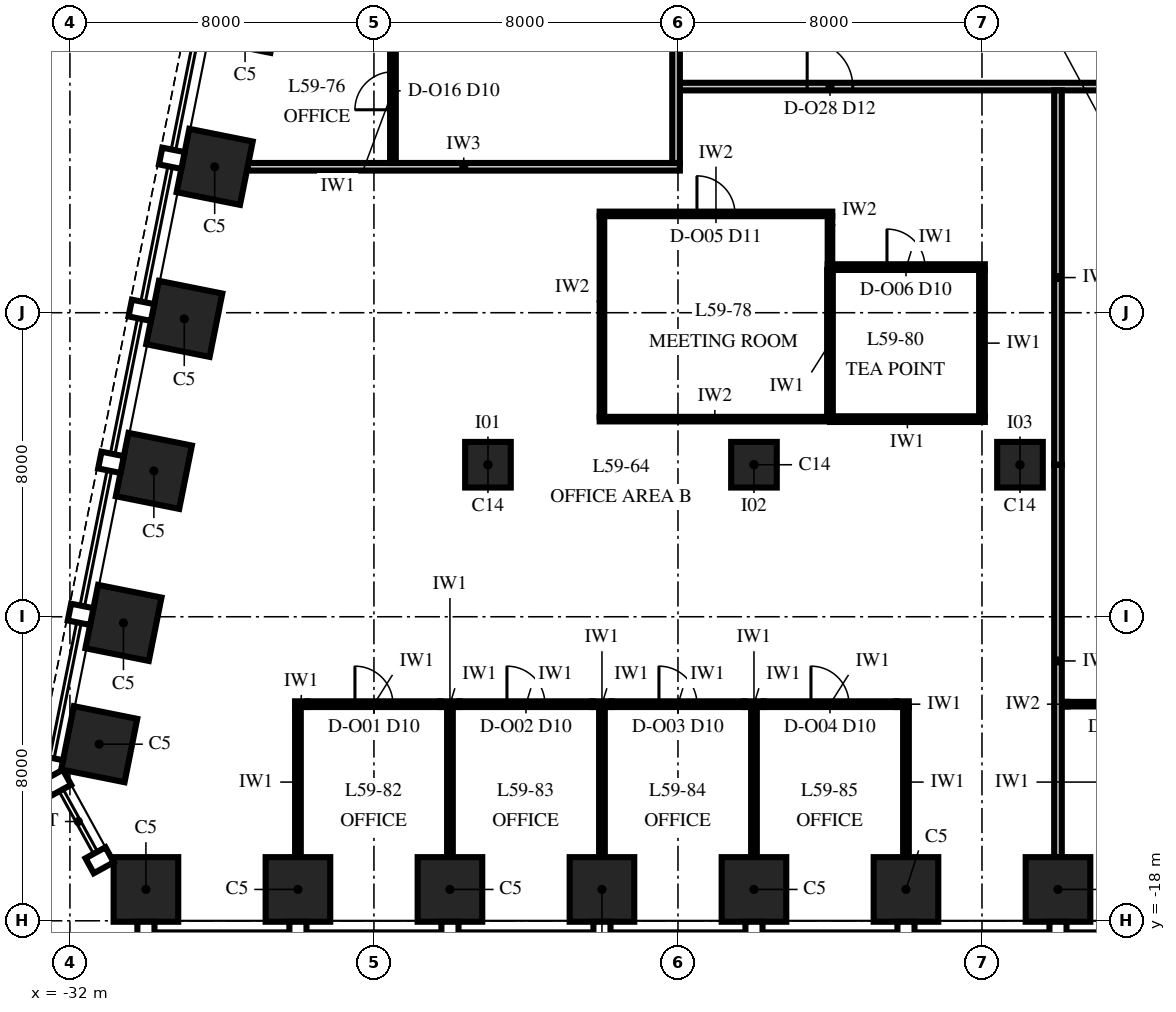
"""IFC4 building model, lengths in metres.
Left out: names, types, materials, properties, quantities, classifications, styles, units other than length and angle.
Written with IfcOpenShell. Run it as: python <this file> out.ifc"""

import sys

from ifc_helpers import new_model, si_unit, direction, frame, frame_2d, origin, origin_2d, place, context, subcontext, project, spatial, rectangle, extrude, element, fill, save


model = new_model("IFC4")
c1 = context("Model", 3, precision=1e-05, world=origin(), true_north=direction((0.0, 1.0)))
c2 = subcontext(c1, "Body", "Model", "MODEL_VIEW")
j1 = project(units=[si_unit("LENGTHUNIT", "METRE"), si_unit("PLANEANGLEUNIT", "RADIAN")], contexts=[c1])
p1 = place(None, origin())
s1 = spatial("IfcSite", under=j1, at=p1, CompositionType="ELEMENT")
p2 = place(p1, origin())
s2 = spatial("IfcBuilding", under=s1, at=p2, CompositionType="ELEMENT")
p3 = place(p2, frame((0.0, 0.0, 256.0)))
s3 = spatial("IfcBuildingStorey", under=s2, at=p3, CompositionType="ELEMENT", Elevation=256.0)
p4 = place(p3, frame((-30.0, -17.175, 0.0), z_axis=(0.0, 0.0, 1.0), x_axis=(1.0, 0.0, 0.0)))
e1 = element("IfcColumn", 1, at=p4, inside=s3, PredefinedType="COLUMN", context=c2, shape_type="SweptSolid", body=[
    extrude(rectangle(XDim=1.7, YDim=1.7, at=origin_2d()), origin(), (0.0, 0.0, 1.0), 4.0),
])
for number, where, z_axis, x_axis in (
    (2, (-26.0, -17.175, 0.0), (0.0, 0.0, 1.0), (1.0, 0.0, 0.0)),
    (3, (-22.0, -17.175, 0.0), (0.0, 0.0, 1.0), (1.0, 0.0, 0.0)),
    (4, (-18.0, -17.175, 0.0), (0.0, 0.0, 1.0), (1.0, 0.0, 0.0)),
    (5, (-14.0, -17.175, 0.0), (0.0, 0.0, 1.0), (1.0, 0.0, 0.0)),
    (6, (-10.0, -17.175, 0.0), (0.0, 0.0, 1.0), (1.0, 0.0, 0.0)),
    (7, (-6.0, -17.175, 0.0), (0.0, 0.0, 1.0), (1.0, 0.0, 0.0)),
):
    element("IfcColumn", number, at=place(p3, frame(where, z_axis=z_axis, x_axis=x_axis)), inside=s3, PredefinedType="COLUMN", context=c2, shape_type="SweptSolid", body=[
        extrude(rectangle(XDim=1.7, YDim=1.7, at=origin_2d()), origin(), (0.0, 0.0, 1.0), 3.75),
    ])
for number, where, z_axis, x_axis in (
    (8, (-27.391, 5.838, 0.0), (0.0, 0.0, 1.0), (-0.196, -0.981, 0.0)),
    (9, (-28.191, 1.838, 0.0), (0.0, 0.0, 1.0), (-0.196, -0.981, 0.0)),
    (10, (-28.991, -2.162, 0.0), (0.0, 0.0, 1.0), (-0.196, -0.981, 0.0)),
    (11, (-29.791, -6.162, 0.0), (0.0, 0.0, 1.0), (-0.196, -0.981, 0.0)),
    (12, (-30.591, -10.162, 0.0), (0.0, 0.0, 1.0), (-0.196, -0.981, 0.0)),
):
    element("IfcColumn", number, at=place(p3, frame(where, z_axis=z_axis, x_axis=x_axis)), inside=s3, PredefinedType="COLUMN", context=c2, shape_type="SweptSolid", body=[
        extrude(rectangle(XDim=1.7, YDim=1.7, at=origin_2d()), origin(), (0.0, 0.0, 1.0), 4.0),
    ])
p5 = place(p3, frame((-31.229, -13.353, 0.0), z_axis=(0.0, 0.0, 1.0), x_axis=(-0.196116135138, -0.980580675691, 0.0)))
e13 = element("IfcColumn", 13, at=p5, inside=s3, PredefinedType="COLUMN", context=c2, shape_type="SweptSolid", body=[
    extrude(rectangle(XDim=1.7, YDim=1.7, at=origin_2d()), origin(), (0.0, 0.0, 1.0), 3.75),
])
for number, where, z_axis, x_axis in (
    (14, (-21.0, -6.0, 0.0), (0.0, 0.0, 1.0), (1.0, 0.0, 0.0)),
    (15, (-14.0, -6.0, 0.0), (0.0, 0.0, 1.0), (1.0, 0.0, 0.0)),
    (16, (-7.0, -6.0, 0.0), (0.0, 0.0, 1.0), (1.0, 0.0, 0.0)),
):
    element("IfcColumn", number, at=place(p3, frame(where, z_axis=z_axis, x_axis=x_axis)), inside=s3, PredefinedType="COLUMN", context=c2, shape_type="SweptSolid", body=[
        extrude(rectangle(XDim=1.2, YDim=1.2, at=origin_2d()), origin(), (0.0, 0.0, 1.0), 4.0),
    ])
p6 = place(p3, frame((-26.075, -12.3, 0.0), z_axis=(0.0, 0.0, 1.0), x_axis=(1.0, 0.0, 0.0)))
e17 = element("IfcWall", 17, at=p6, inside=s3, PredefinedType="PARTITIONING", context=c2, shape_type="SweptSolid", body=[
    extrude(rectangle(XDim=0.325, YDim=0.15, at=frame_2d((0.163, 0.0))), origin(), (0.0, 0.0, 1.0), 2.15),
])
p7 = place(p3, frame((-25.75, -12.3, 0.0), z_axis=(0.0, 0.0, 1.0), x_axis=(1.0, 0.0, 0.0)))
e18 = element("IfcWall", 18, at=p7, inside=s3, PredefinedType="PARTITIONING", context=c2, shape_type="SweptSolid", body=[
    extrude(rectangle(XDim=3.5, YDim=0.15, at=frame_2d((1.75, 0.0))), origin(), (0.0, 0.0, 1.0), 3.85),
])
p8 = place(p7, frame((1.25, 0.0, 0.0)))
e19 = element("IfcOpeningElement", 19, at=p8, cuts=e18, PredefinedType="OPENING", context=c2, shape_type="SweptSolid", body=[
    extrude(rectangle(XDim=1.0, YDim=2.3, at=frame_2d((0.5, 1.15))), frame((0.0, 0.09, 0.0), z_axis=(0.0, -1.0, 0.0), x_axis=(1.0, 0.0, 0.0)), (0.0, 0.0, 1.0), 0.18),
])
p9 = place(p3, frame((-22.25, -12.3, 0.0), z_axis=(0.0, 0.0, 1.0), x_axis=(1.0, 0.0, 0.0)))
e20 = element("IfcWall", 20, at=p9, inside=s3, PredefinedType="PARTITIONING", context=c2, shape_type="SweptSolid", body=[
    extrude(rectangle(XDim=0.5, YDim=0.15, at=frame_2d((0.25, 0.0))), origin(), (0.0, 0.0, 1.0), 2.15),
])
p10 = place(p3, frame((-21.75, -12.3, 0.0), z_axis=(0.0, 0.0, 1.0), x_axis=(1.0, 0.0, 0.0)))
e21 = element("IfcWall", 21, at=p10, inside=s3, PredefinedType="PARTITIONING", context=c2, shape_type="SweptSolid", body=[
    extrude(rectangle(XDim=3.5, YDim=0.15, at=frame_2d((1.75, 0.0))), origin(), (0.0, 0.0, 1.0), 3.85),
])
p11 = place(p10, frame((1.25, 0.0, 0.0)))
e22 = element("IfcOpeningElement", 22, at=p11, cuts=e21, PredefinedType="OPENING", context=c2, shape_type="SweptSolid", body=[
    extrude(rectangle(XDim=1.0, YDim=2.3, at=frame_2d((0.5, 1.15))), frame((0.0, 0.09, 0.0), z_axis=(0.0, -1.0, 0.0), x_axis=(1.0, 0.0, 0.0)), (0.0, 0.0, 1.0), 0.18),
])
p12 = place(p3, frame((-18.25, -12.3, 0.0), z_axis=(0.0, 0.0, 1.0), x_axis=(1.0, 0.0, 0.0)))
e23 = element("IfcWall", 23, at=p12, inside=s3, PredefinedType="PARTITIONING", context=c2, shape_type="SweptSolid", body=[
    extrude(rectangle(XDim=0.5, YDim=0.15, at=frame_2d((0.25, 0.0))), origin(), (0.0, 0.0, 1.0), 2.15),
])
p13 = place(p3, frame((-17.75, -12.3, 0.0), z_axis=(0.0, 0.0, 1.0), x_axis=(1.0, 0.0, 0.0)))
e24 = element("IfcWall", 24, at=p13, inside=s3, PredefinedType="PARTITIONING", context=c2, shape_type="SweptSolid", body=[
    extrude(rectangle(XDim=3.5, YDim=0.15, at=frame_2d((1.75, 0.0))), origin(), (0.0, 0.0, 1.0), 3.85),
])
p14 = place(p13, frame((1.25, 0.0, 0.0)))
e25 = element("IfcOpeningElement", 25, at=p14, cuts=e24, PredefinedType="OPENING", context=c2, shape_type="SweptSolid", body=[
    extrude(rectangle(XDim=1.0, YDim=2.3, at=frame_2d((0.5, 1.15))), frame((0.0, 0.09, 0.0), z_axis=(0.0, -1.0, 0.0), x_axis=(1.0, 0.0, 0.0)), (0.0, 0.0, 1.0), 0.18),
])
p15 = place(p3, frame((-14.25, -12.3, 0.0), z_axis=(0.0, 0.0, 1.0), x_axis=(1.0, 0.0, 0.0)))
e26 = element("IfcWall", 26, at=p15, inside=s3, PredefinedType="PARTITIONING", context=c2, shape_type="SweptSolid", body=[
    extrude(rectangle(XDim=0.5, YDim=0.15, at=frame_2d((0.25, 0.0))), origin(), (0.0, 0.0, 1.0), 2.15),
])
p16 = place(p3, frame((-13.75, -12.3, 0.0), z_axis=(0.0, 0.0, 1.0), x_axis=(1.0, 0.0, 0.0)))
e27 = element("IfcWall", 27, at=p16, inside=s3, PredefinedType="PARTITIONING", context=c2, shape_type="SweptSolid", body=[
    extrude(rectangle(XDim=3.5, YDim=0.15, at=frame_2d((1.75, 0.0))), origin(), (0.0, 0.0, 1.0), 3.85),
])
p17 = place(p16, frame((1.25, 0.0, 0.0)))
e28 = element("IfcOpeningElement", 28, at=p17, cuts=e27, PredefinedType="OPENING", context=c2, shape_type="SweptSolid", body=[
    extrude(rectangle(XDim=1.0, YDim=2.3, at=frame_2d((0.5, 1.15))), frame((0.0, 0.09, 0.0), z_axis=(0.0, -1.0, 0.0), x_axis=(1.0, 0.0, 0.0)), (0.0, 0.0, 1.0), 0.18),
])
p18 = place(p3, frame((-10.25, -12.3, 0.0), z_axis=(0.0, 0.0, 1.0), x_axis=(1.0, 0.0, 0.0)))
e29 = element("IfcWall", 29, at=p18, inside=s3, PredefinedType="PARTITIONING", context=c2, shape_type="SweptSolid", body=[
    extrude(rectangle(XDim=0.325, YDim=0.15, at=frame_2d((0.163, 0.0))), origin(), (0.0, 0.0, 1.0), 2.15),
])
p19 = place(p3, frame((-5.9, -12.3, 0.0), z_axis=(0.0, 0.0, 1.0), x_axis=(1.0, 0.0, 0.0)))
e30 = element("IfcWall", 30, at=p19, inside=s3, PredefinedType="PARTITIONING", context=c2, shape_type="SweptSolid", body=[
    extrude(rectangle(XDim=0.15, YDim=0.12, at=frame_2d((0.075, 0.0))), origin(), (0.0, 0.0, 1.0), 2.15),
])
p20 = place(p3, frame((-5.75, -12.3, 0.0), z_axis=(0.0, 0.0, 1.0), x_axis=(1.0, 0.0, 0.0)))
e31 = element("IfcWall", 31, at=p20, inside=s3, PredefinedType="PARTITIONING", context=c2, shape_type="SweptSolid", body=[
    extrude(rectangle(XDim=3.5, YDim=0.12, at=frame_2d((1.75, 0.0))), origin(), (0.0, 0.0, 1.0), 3.85),
])
p21 = place(p20, frame((1.25, 0.0, 0.0)))
e32 = element("IfcOpeningElement", 32, at=p21, cuts=e31, PredefinedType="OPENING", context=c2, shape_type="SweptSolid", body=[
    extrude(rectangle(XDim=1.0, YDim=2.4, at=frame_2d((0.5, 1.2))), frame((0.0, 0.075, 0.0), z_axis=(0.0, -1.0, 0.0), x_axis=(1.0, 0.0, 0.0)), (0.0, 0.0, 1.0), 0.15),
])
p22 = place(p3, frame((-18.06, -4.8, 0.0), z_axis=(0.0, 0.0, 1.0), x_axis=(1.0, 0.0, 0.0)))
e33 = element("IfcWall", 33, at=p22, inside=s3, PredefinedType="PARTITIONING", context=c2, shape_type="SweptSolid", body=[
    extrude(rectangle(XDim=6.06, YDim=0.12, at=frame_2d((3.03, 0.0))), origin(), (0.0, 0.0, 1.0), 3.23),
])
p23 = place(p3, frame((-12.0, -4.8, 0.0), z_axis=(0.0, 0.0, 1.0), x_axis=(1.0, 0.0, 0.0)))
e34 = element("IfcWall", 34, at=p23, inside=s3, PredefinedType="PARTITIONING", context=c2, shape_type="SweptSolid", body=[
    extrude(rectangle(XDim=4.075, YDim=0.15, at=frame_2d((2.038, 0.0))), origin(), (0.0, 0.0, 1.0), 3.23),
])
p24 = place(p3, frame((-12.06, -0.8, 0.0), z_axis=(0.0, 0.0, 1.0), x_axis=(1.0, 0.0, 0.0)))
e35 = element("IfcWall", 35, at=p24, inside=s3, PredefinedType="PARTITIONING", context=c2, shape_type="SweptSolid", body=[
    extrude(rectangle(XDim=4.135, YDim=0.15, at=frame_2d((2.067, 0.0))), origin(), (0.0, 0.0, 1.0), 3.23),
])
p25 = place(p24, frame((1.56, 0.0, 0.0)))
e36 = element("IfcOpeningElement", 36, at=p25, cuts=e35, PredefinedType="OPENING", context=c2, shape_type="SweptSolid", body=[
    extrude(rectangle(XDim=1.0, YDim=2.3, at=frame_2d((0.5, 1.15))), frame((0.0, 0.09, 0.0), z_axis=(0.0, -1.0, 0.0), x_axis=(1.0, 0.0, 0.0)), (0.0, 0.0, 1.0), 0.18),
])
p26 = place(p3, frame((-18.06, 0.6, 0.0), z_axis=(0.0, 0.0, 1.0), x_axis=(1.0, 0.0, 0.0)))
e37 = element("IfcWall", 37, at=p26, inside=s3, PredefinedType="PARTITIONING", context=c2, shape_type="SweptSolid", body=[
    extrude(rectangle(XDim=6.12, YDim=0.12, at=frame_2d((3.06, 0.0))), origin(), (0.0, 0.0, 1.0), 3.23),
])
p27 = place(p26, frame((2.56, 0.0, 0.0)))
e38 = element("IfcOpeningElement", 38, at=p27, cuts=e37, PredefinedType="OPENING", context=c2, shape_type="SweptSolid", body=[
    extrude(rectangle(XDim=1.0, YDim=2.4, at=frame_2d((0.5, 1.2))), frame((0.0, 0.075, 0.0), z_axis=(0.0, -1.0, 0.0), x_axis=(1.0, 0.0, 0.0)), (0.0, 0.0, 1.0), 0.15),
])
p28 = place(p3, frame((-27.324, 1.84, 0.0), z_axis=(0.0, 0.0, 1.0), x_axis=(1.0, 0.0, 0.0)))
e39 = element("IfcWall", 39, at=p28, inside=s3, PredefinedType="PARTITIONING", context=c2, shape_type="SweptSolid", body=[
    extrude(rectangle(XDim=11.374, YDim=0.2, at=frame_2d((5.687, 0.0))), origin(), (0.0, 0.0, 1.0), 3.23),
])
p29 = place(p3, frame((-15.95, 3.95, 0.0), z_axis=(0.0, 0.0, 1.0), x_axis=(1.0, 0.0, 0.0)))
e40 = element("IfcWall", 40, at=p29, inside=s3, PredefinedType="PARTITIONING", context=c2, shape_type="SweptSolid", body=[
    extrude(rectangle(XDim=31.9, YDim=0.2, at=frame_2d((15.95, 0.0))), origin(), (0.0, 0.0, 1.0), 3.23),
])
p30 = place(p29, frame((3.35, 0.0, 0.0)))
e41 = element("IfcOpeningElement", 41, at=p30, cuts=e40, PredefinedType="OPENING", context=c2, shape_type="SweptSolid", body=[
    extrude(rectangle(XDim=1.2, YDim=2.4, at=frame_2d((0.6, 1.2))), frame((0.0, 0.115, 0.0), z_axis=(0.0, -1.0, 0.0), x_axis=(1.0, 0.0, 0.0)), (0.0, 0.0, 1.0), 0.23),
])
p31 = place(p29, frame((27.35, 0.0, 0.0)))
e42 = element("IfcOpeningElement", 42, at=p31, cuts=e40, PredefinedType="OPENING", context=c2, shape_type="SweptSolid", body=[
    extrude(rectangle(XDim=1.2, YDim=2.4, at=frame_2d((0.6, 1.2))), frame((0.0, 0.115, 0.0), z_axis=(0.0, -1.0, 0.0), x_axis=(1.0, 0.0, 0.0)), (0.0, 0.0, 1.0), 0.23),
])
p32 = place(p29, frame((15.35, 0.0, 0.0)))
e43 = element("IfcOpeningElement", 43, at=p32, cuts=e40, PredefinedType="OPENING", context=c2, shape_type="SweptSolid", body=[
    extrude(rectangle(XDim=1.2, YDim=2.4, at=frame_2d((0.6, 1.2))), frame((0.0, 0.115, 0.0), z_axis=(0.0, -1.0, 0.0), x_axis=(1.0, 0.0, 0.0)), (0.0, 0.0, 1.0), 0.23),
])
p33 = place(p3, frame((-26.0, -16.325, 0.0), z_axis=(0.0, 0.0, 1.0), x_axis=(0.0, 1.0, 0.0)))
e44 = element("IfcWall", 44, at=p33, inside=s3, PredefinedType="PARTITIONING", context=c2, shape_type="SweptSolid", body=[
    extrude(rectangle(XDim=3.95, YDim=0.15, at=frame_2d((1.975, 0.0))), origin(), (0.0, 0.0, 1.0), 2.15),
])
p34 = place(p3, frame((-23.5, 1.94, 0.0), z_axis=(0.0, 0.0, 1.0), x_axis=(0.0, 1.0, 0.0)))
e45 = element("IfcWall", 45, at=p34, inside=s3, PredefinedType="PARTITIONING", context=c2, shape_type="SweptSolid", body=[
    extrude(rectangle(XDim=3.825, YDim=0.15, at=frame_2d((1.913, 0.0))), origin(), (0.0, 0.0, 1.0), 3.85),
])
p35 = place(p34, frame((1.4, 0.0, 0.0)))
e46 = element("IfcOpeningElement", 46, at=p35, cuts=e45, PredefinedType="OPENING", context=c2, shape_type="SweptSolid", body=[
    extrude(rectangle(XDim=1.0, YDim=2.3, at=frame_2d((0.5, 1.15))), frame((0.0, 0.09, 0.0), z_axis=(0.0, -1.0, 0.0), x_axis=(1.0, 0.0, 0.0)), (0.0, 0.0, 1.0), 0.18),
])
for number, where, z_axis, x_axis in (
    (47, (-22.0, -16.325, 0.0), (0.0, 0.0, 1.0), (0.0, 1.0, 0.0)),
    (48, (-18.0, -16.325, 0.0), (0.0, 0.0, 1.0), (0.0, 1.0, 0.0)),
):
    element("IfcWall", number, at=place(p3, frame(where, z_axis=z_axis, x_axis=x_axis)), inside=s3, PredefinedType="PARTITIONING", context=c2, shape_type="SweptSolid", body=[
        extrude(rectangle(XDim=3.95, YDim=0.15, at=frame_2d((1.975, 0.0))), origin(), (0.0, 0.0, 1.0), 2.15),
    ])
p36 = place(p3, frame((-18.0, -4.74, 0.0), z_axis=(0.0, 0.0, 1.0), x_axis=(0.0, 1.0, 0.0)))
e49 = element("IfcWall", 49, at=p36, inside=s3, PredefinedType="PARTITIONING", context=c2, shape_type="SweptSolid", body=[
    extrude(rectangle(XDim=5.28, YDim=0.12, at=frame_2d((2.64, 0.0))), origin(), (0.0, 0.0, 1.0), 3.23),
])
p37 = place(p3, frame((-16.05, 1.94, 0.0), z_axis=(0.0, 0.0, 1.0), x_axis=(0.0, 1.0, 0.0)))
e50 = element("IfcWall", 50, at=p37, inside=s3, PredefinedType="PARTITIONING", context=c2, shape_type="SweptSolid", body=[
    extrude(rectangle(XDim=24.01, YDim=0.2, at=frame_2d((12.005, 0.0))), origin(), (0.0, 0.0, 1.0), 2.842),
])
p38 = place(p37, frame((8.46, 0.0, 0.0)))
e51 = element("IfcOpeningElement", 51, at=p38, cuts=e50, PredefinedType="OPENING", context=c2, shape_type="SweptSolid", body=[
    extrude(rectangle(XDim=1.2, YDim=2.4, at=frame_2d((0.6, 1.2))), frame((0.0, 0.115, 0.0), z_axis=(0.0, -1.0, 0.0), x_axis=(1.0, 0.0, 0.0)), (0.0, 0.0, 1.0), 0.23),
])
p39 = place(p3, frame((-14.0, -16.325, 0.0), z_axis=(0.0, 0.0, 1.0), x_axis=(0.0, 1.0, 0.0)))
e52 = element("IfcWall", 52, at=p39, inside=s3, PredefinedType="PARTITIONING", context=c2, shape_type="SweptSolid", body=[
    extrude(rectangle(XDim=3.95, YDim=0.15, at=frame_2d((1.975, 0.0))), origin(), (0.0, 0.0, 1.0), 2.15),
])
p40 = place(p3, frame((-12.0, -4.725, 0.0), z_axis=(0.0, 0.0, 1.0), x_axis=(0.0, 1.0, 0.0)))
e53 = element("IfcWall", 53, at=p40, inside=s3, PredefinedType="PARTITIONING", context=c2, shape_type="SweptSolid", body=[
    extrude(rectangle(XDim=3.85, YDim=0.15, at=frame_2d((1.925, 0.0))), origin(), (0.0, 0.0, 1.0), 3.85),
])
p41 = place(p3, frame((-12.0, -0.725, 0.0), z_axis=(0.0, 0.0, 1.0), x_axis=(0.0, 1.0, 0.0)))
e54 = element("IfcWall", 54, at=p41, inside=s3, PredefinedType="PARTITIONING", context=c2, shape_type="SweptSolid", body=[
    extrude(rectangle(XDim=1.265, YDim=0.12, at=frame_2d((0.633, 0.0))), origin(), (0.0, 0.0, 1.0), 3.85),
])
p42 = place(p3, frame((-10.0, -16.325, 0.0), z_axis=(0.0, 0.0, 1.0), x_axis=(0.0, 1.0, 0.0)))
e55 = element("IfcWall", 55, at=p42, inside=s3, PredefinedType="PARTITIONING", context=c2, shape_type="SweptSolid", body=[
    extrude(rectangle(XDim=3.95, YDim=0.15, at=frame_2d((1.975, 0.0))), origin(), (0.0, 0.0, 1.0), 2.15),
])
p43 = place(p3, frame((-8.0, -4.725, 0.0), z_axis=(0.0, 0.0, 1.0), x_axis=(0.0, 1.0, 0.0)))
e56 = element("IfcWall", 56, at=p43, inside=s3, PredefinedType="PARTITIONING", context=c2, shape_type="SweptSolid", body=[
    extrude(rectangle(XDim=3.85, YDim=0.15, at=frame_2d((1.925, 0.0))), origin(), (0.0, 0.0, 1.0), 3.85),
])
p44 = place(p3, frame((-6.0, -16.325, 0.0), z_axis=(0.0, 0.0, 1.0), x_axis=(0.0, 1.0, 0.0)))
e57 = element("IfcWall", 57, at=p44, inside=s3, PredefinedType="PARTITIONING", context=c2, shape_type="SweptSolid", body=[
    extrude(rectangle(XDim=10.325, YDim=0.2, at=frame_2d((5.163, 0.0))), origin(), (0.0, 0.0, 1.0), 2.15),
])
p45 = place(p3, frame((-6.0, -6.0, 0.0), z_axis=(0.0, 0.0, 1.0), x_axis=(0.0, 1.0, 0.0)))
e58 = element("IfcWall", 58, at=p45, inside=s3, PredefinedType="PARTITIONING", context=c2, shape_type="SweptSolid", body=[
    extrude(rectangle(XDim=9.85, YDim=0.2, at=frame_2d((4.925, 0.0))), origin(), (0.0, 0.0, 1.0), 2.85),
])
p46 = place(p8, origin())
e59 = element("IfcDoor", 59, at=p46, inside=s3, OperationType="SINGLE_SWING_LEFT", PredefinedType="DOOR", context=c2, shape_type="SweptSolid", body=[
    extrude(rectangle(XDim=1.0, YDim=2.3, at=frame_2d((0.5, 1.15))), frame((0.0, 0.075, 0.0), z_axis=(0.0, -1.0, 0.0), x_axis=(1.0, 0.0, 0.0)), (0.0, 0.0, 1.0), 0.149),
])
fill(e19, e59)
p47 = place(p11, origin())
e60 = element("IfcDoor", 60, at=p47, inside=s3, OperationType="SINGLE_SWING_LEFT", PredefinedType="DOOR", context=c2, shape_type="SweptSolid", body=[
    extrude(rectangle(XDim=1.0, YDim=2.3, at=frame_2d((0.5, 1.15))), frame((0.0, 0.075, 0.0), z_axis=(0.0, -1.0, 0.0), x_axis=(1.0, 0.0, 0.0)), (0.0, 0.0, 1.0), 0.149),
])
fill(e22, e60)
p48 = place(p14, origin())
e61 = element("IfcDoor", 61, at=p48, inside=s3, OperationType="SINGLE_SWING_LEFT", PredefinedType="DOOR", context=c2, shape_type="SweptSolid", body=[
    extrude(rectangle(XDim=1.0, YDim=2.3, at=frame_2d((0.5, 1.15))), frame((0.0, 0.075, 0.0), z_axis=(0.0, -1.0, 0.0), x_axis=(1.0, 0.0, 0.0)), (0.0, 0.0, 1.0), 0.149),
])
fill(e25, e61)
p49 = place(p17, origin())
e62 = element("IfcDoor", 62, at=p49, inside=s3, OperationType="SINGLE_SWING_LEFT", PredefinedType="DOOR", context=c2, shape_type="SweptSolid", body=[
    extrude(rectangle(XDim=1.0, YDim=2.3, at=frame_2d((0.5, 1.15))), frame((0.0, 0.075, 0.0), z_axis=(0.0, -1.0, 0.0), x_axis=(1.0, 0.0, 0.0)), (0.0, 0.0, 1.0), 0.149),
])
fill(e28, e62)
p50 = place(p27, origin())
e63 = element("IfcDoor", 63, at=p50, inside=s3, OperationType="SINGLE_SWING_RIGHT", PredefinedType="DOOR", context=c2, shape_type="SweptSolid", body=[
    extrude(rectangle(XDim=1.0, YDim=2.4, at=frame_2d((0.5, 1.2))), frame((0.0, 0.06, 0.0), z_axis=(0.0, -1.0, 0.0), x_axis=(1.0, 0.0, 0.0)), (0.0, 0.0, 1.0), 0.12),
])
fill(e38, e63)
p51 = place(p25, origin())
e64 = element("IfcDoor", 64, at=p51, inside=s3, OperationType="SINGLE_SWING_LEFT", PredefinedType="DOOR", context=c2, shape_type="SweptSolid", body=[
    extrude(rectangle(XDim=1.0, YDim=2.3, at=frame_2d((0.5, 1.15))), frame((0.0, 0.075, 0.0), z_axis=(0.0, -1.0, 0.0), x_axis=(1.0, 0.0, 0.0)), (0.0, 0.0, 1.0), 0.149),
])
fill(e36, e64)
p52 = place(p35, origin())
e65 = element("IfcDoor", 65, at=p52, inside=s3, OperationType="SINGLE_SWING_LEFT", PredefinedType="DOOR", context=c2, shape_type="SweptSolid", body=[
    extrude(rectangle(XDim=1.0, YDim=2.3, at=frame_2d((0.5, 1.15))), frame((0.0, 0.075, 0.0), z_axis=(0.0, -1.0, 0.0), x_axis=(1.0, 0.0, 0.0)), (0.0, 0.0, 1.0), 0.149),
])
fill(e46, e65)
p53 = place(p30, origin())
e66 = element("IfcDoor", 66, at=p53, inside=s3, OperationType="SINGLE_SWING_LEFT", PredefinedType="DOOR", context=c2, shape_type="SweptSolid", body=[
    extrude(rectangle(XDim=1.2, YDim=2.4, at=frame_2d((0.6, 1.2))), frame((0.0, 0.1, 0.0), z_axis=(0.0, -1.0, 0.0), x_axis=(1.0, 0.0, 0.0)), (0.0, 0.0, 1.0), 0.199),
])
fill(e41, e66)
save(model, sys.argv[1])
